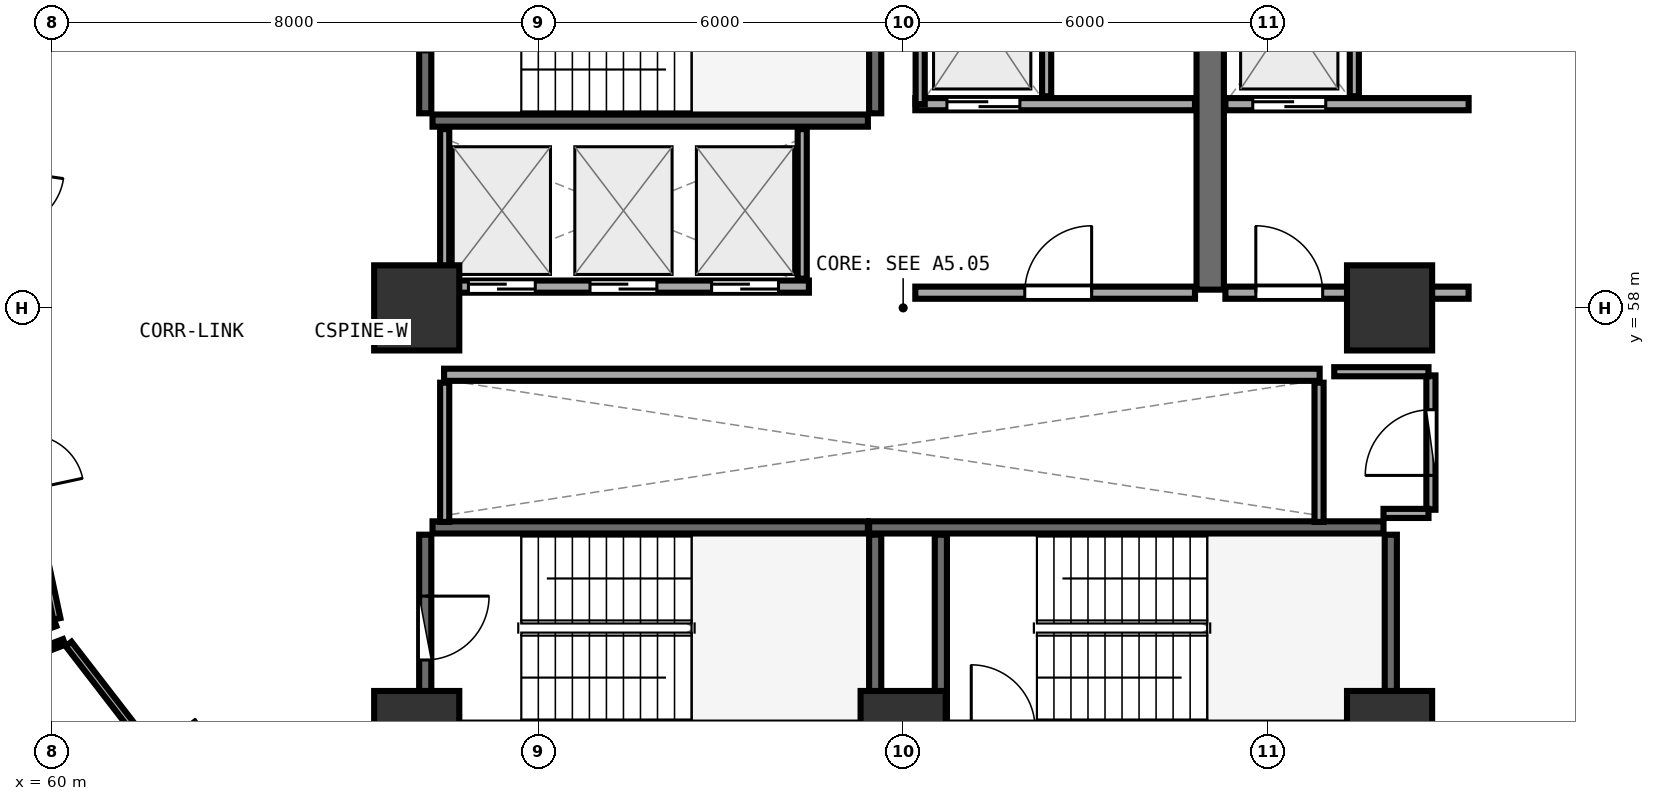
"""IFC4 building model, lengths in metres.
Left out: names, types, materials, properties, quantities, classifications, styles, units other than length and angle.
Written with IfcOpenShell. Run it as: python <this file> out.ifc"""

import sys

from ifc_helpers import new_model, si_unit, direction, frame, frame_2d, origin, origin_2d, place, context, subcontext, project, spatial, rectangle, extrude, element, fill, save


model = new_model("IFC4")
c1 = context("Model", 3, precision=1e-05, world=origin(), true_north=direction((0.0, 1.0)))
c2 = subcontext(c1, "Body", "Model", "MODEL_VIEW")
j1 = project(units=[si_unit("LENGTHUNIT", "METRE"), si_unit("PLANEANGLEUNIT", "RADIAN")], contexts=[c1])
p1 = place(None, origin())
s1 = spatial("IfcSite", under=j1, at=p1, CompositionType="ELEMENT")
p2 = place(p1, origin())
s2 = spatial("IfcBuilding", under=s1, at=p2, CompositionType="ELEMENT")
p3 = place(p2, frame((0.0, 0.0, 76.35)))
s3 = spatial("IfcBuildingStorey", under=s2, at=p3, CompositionType="ELEMENT", Elevation=76.35)
for number, where, z_axis, x_axis in (
    (1, (66.0, 51.0, 0.0), (0.0, 0.0, 1.0), (1.0, 0.0, 0.0)),
    (2, (74.0, 51.0, 0.0), (0.0, 0.0, 1.0), (1.0, 0.0, 0.0)),
    (3, (82.0, 51.0, 0.0), (0.0, 0.0, 1.0), (1.0, 0.0, 0.0)),
    (4, (82.0, 58.0, 0.0), (0.0, 0.0, 1.0), (1.0, 0.0, 0.0)),
    (5, (66.0, 58.0, 0.0), (0.0, 0.0, 1.0), (1.0, 0.0, 0.0)),
):
    element("IfcColumn", number, at=place(p3, frame(where, z_axis=z_axis, x_axis=x_axis)), inside=s3, PredefinedType="PILASTER", context=c2, shape_type="SweptSolid", body=[
        extrude(rectangle(XDim=1.4, YDim=1.4, at=origin_2d()), origin(), (0.0, 0.0, 1.0), 3.75),
    ])
p4 = place(p3, frame((66.26, 61.08, 0.0), z_axis=(0.0, 0.0, 1.0), x_axis=(1.0, 0.0, 0.0)))
e6 = element("IfcWall", 6, at=p4, inside=s3, PredefinedType="SHEAR", context=c2, shape_type="SweptSolid", body=[
    extrude(rectangle(XDim=7.16, YDim=0.2, at=frame_2d((3.58, 0.0))), origin(), (0.0, 0.0, 1.0), 3.49),
])
p5 = place(p3, frame((73.54, 61.2, 0.0), z_axis=(0.0, 0.0, 1.0), x_axis=(0.0, 1.0, 0.0)))
e7 = element("IfcWall", 7, at=p5, inside=s3, PredefinedType="SHEAR", context=c2, shape_type="SweptSolid", body=[
    extrude(rectangle(XDim=3.07, YDim=0.2, at=frame_2d((1.535, 0.0))), origin(), (0.0, 0.0, 1.0), 3.49),
])
p6 = place(p3, frame((66.14, 64.27, 0.0), z_axis=(0.0, 0.0, 1.0), x_axis=(0.0, -1.0, 0.0)))
e8 = element("IfcWall", 8, at=p6, inside=s3, PredefinedType="SHEAR", context=c2, shape_type="SweptSolid", body=[
    extrude(rectangle(XDim=3.07, YDim=0.2, at=frame_2d((1.535, 0.0))), origin(), (0.0, 0.0, 1.0), 3.49),
])
p7 = place(p6, frame((1.01, 0.0, 0.0)))
e9 = element("IfcOpeningElement", 9, at=p7, cuts=e8, PredefinedType="OPENING", context=c2, shape_type="SweptSolid", body=[
    extrude(rectangle(XDim=1.05, YDim=2.1, at=frame_2d((0.525, 1.05))), frame((0.0, 0.11, 0.0), z_axis=(0.0, -1.0, 0.0), x_axis=(1.0, 0.0, 0.0)), (0.0, 0.0, 1.0), 0.22),
])
p8 = place(p3, frame((82.02, 51.2, 0.0), z_axis=(0.0, 0.0, 1.0), x_axis=(0.0, 1.0, 0.0)))
e10 = element("IfcWall", 10, at=p8, inside=s3, PredefinedType="SHEAR", context=c2, shape_type="SweptSolid", body=[
    extrude(rectangle(XDim=3.07, YDim=0.2, at=frame_2d((1.535, 0.0))), origin(), (0.0, 0.0, 1.0), 3.49),
])
p9 = place(p3, frame((81.9, 54.39, 0.0), z_axis=(0.0, 0.0, 1.0), x_axis=(-1.0, 0.0, 0.0)))
e11 = element("IfcWall", 11, at=p9, inside=s3, PredefinedType="SHEAR", context=c2, shape_type="SweptSolid", body=[
    extrude(rectangle(XDim=8.46, YDim=0.2, at=frame_2d((4.23, 0.0))), origin(), (0.0, 0.0, 1.0), 3.49),
])
for number, where, z_axis, x_axis in (
    (12, (74.62, 54.27, 0.0), (0.0, 0.0, 1.0), (0.0, -1.0, 0.0)),
    (13, (73.54, 51.2, 0.0), (0.0, 0.0, 1.0), (0.0, 1.0, 0.0)),
):
    element("IfcWall", number, at=place(p3, frame(where, z_axis=z_axis, x_axis=x_axis)), inside=s3, PredefinedType="SHEAR", context=c2, shape_type="SweptSolid", body=[
        extrude(rectangle(XDim=3.07, YDim=0.2, at=frame_2d((1.535, 0.0))), origin(), (0.0, 0.0, 1.0), 3.49),
    ])
p10 = place(p3, frame((73.42, 54.39, 0.0), z_axis=(0.0, 0.0, 1.0), x_axis=(-1.0, 0.0, 0.0)))
e14 = element("IfcWall", 14, at=p10, inside=s3, PredefinedType="SHEAR", context=c2, shape_type="SweptSolid", body=[
    extrude(rectangle(XDim=7.16, YDim=0.2, at=frame_2d((3.58, 0.0))), origin(), (0.0, 0.0, 1.0), 3.49),
])
p11 = place(p3, frame((66.14, 54.27, 0.0), z_axis=(0.0, 0.0, 1.0), x_axis=(0.0, -1.0, 0.0)))
e15 = element("IfcWall", 15, at=p11, inside=s3, PredefinedType="SHEAR", context=c2, shape_type="SweptSolid", body=[
    extrude(rectangle(XDim=3.07, YDim=0.2, at=frame_2d((1.535, 0.0))), origin(), (0.0, 0.0, 1.0), 3.49),
])
p12 = place(p11, frame((1.01, 0.0, 0.0)))
e16 = element("IfcOpeningElement", 16, at=p12, cuts=e15, PredefinedType="OPENING", context=c2, shape_type="SweptSolid", body=[
    extrude(rectangle(XDim=1.05, YDim=2.1, at=frame_2d((0.525, 1.05))), frame((0.0, 0.11, 0.0), z_axis=(0.0, -1.0, 0.0), x_axis=(1.0, 0.0, 0.0)), (0.0, 0.0, 1.0), 0.22),
])
p13 = place(p3, frame((79.05, 58.3, 0.0), z_axis=(0.0, 0.0, 1.0), x_axis=(0.0, 1.0, 0.0)))
e17 = element("IfcWall", 17, at=p13, inside=s3, PredefinedType="SHEAR", context=c2, shape_type="SweptSolid", body=[
    extrude(rectangle(XDim=6.3, YDim=0.45, at=frame_2d((3.15, 0.0))), origin(), (0.0, 0.0, 1.0), 3.49),
])
p14 = place(p3, frame((74.2, 61.35, 0.0), z_axis=(0.0, 0.0, 1.0), x_axis=(1.0, 0.0, 0.0)))
e18 = element("IfcWall", 18, at=p14, inside=s3, PredefinedType="SOLIDWALL", context=c2, shape_type="SweptSolid", body=[
    extrude(rectangle(XDim=4.6, YDim=0.2, at=frame_2d((2.3, 0.0))), origin(), (0.0, 0.0, 1.0), 3.48),
])
p15 = place(p14, frame((0.52, 0.0, 0.0)))
e19 = element("IfcOpeningElement", 19, at=p15, cuts=e18, PredefinedType="OPENING", context=c2, shape_type="SweptSolid", body=[
    extrude(rectangle(XDim=1.2, YDim=2.15, at=frame_2d((0.6, 1.075))), frame((0.0, 0.11, 0.0), z_axis=(0.0, -1.0, 0.0), x_axis=(1.0, 0.0, 0.0)), (0.0, 0.0, 1.0), 0.22),
])
p16 = place(p3, frame((74.28, 61.35, 0.0), z_axis=(0.0, 0.0, 1.0), x_axis=(0.0, 1.0, 0.0)))
e20 = element("IfcWall", 20, at=p16, inside=s3, PredefinedType="PARTITIONING", context=c2, shape_type="SweptSolid", body=[
    extrude(rectangle(XDim=2.97, YDim=0.15, at=frame_2d((1.485, 0.0))), origin(), (0.0, 0.0, 1.0), 3.48),
])
p17 = place(p3, frame((76.36, 61.48, 0.0), z_axis=(0.0, 0.0, 1.0), x_axis=(0.0, 1.0, 0.0)))
e21 = element("IfcWall", 21, at=p17, inside=s3, PredefinedType="PARTITIONING", context=c2, shape_type="SweptSolid", body=[
    extrude(rectangle(XDim=2.84, YDim=0.15, at=frame_2d((1.42, 0.0))), origin(), (0.0, 0.0, 1.0), 3.48),
])
p18 = place(p3, frame((79.3, 61.35, 0.0), z_axis=(0.0, 0.0, 1.0), x_axis=(1.0, 0.0, 0.0)))
e22 = element("IfcWall", 22, at=p18, inside=s3, PredefinedType="SOLIDWALL", context=c2, shape_type="SweptSolid", body=[
    extrude(rectangle(XDim=4.0, YDim=0.2, at=frame_2d((2.0, 0.0))), origin(), (0.0, 0.0, 1.0), 2.775),
])
p19 = place(p18, frame((0.45, 0.0, 0.0)))
e23 = element("IfcOpeningElement", 23, at=p19, cuts=e22, PredefinedType="OPENING", context=c2, shape_type="SweptSolid", body=[
    extrude(rectangle(XDim=1.2, YDim=2.15, at=frame_2d((0.6, 1.075))), frame((0.0, 0.11, 0.0), z_axis=(0.0, -1.0, 0.0), x_axis=(1.0, 0.0, 0.0)), (0.0, 0.0, 1.0), 0.22),
])
p20 = place(p3, frame((81.42, 61.48, 0.0), z_axis=(0.0, 0.0, 1.0), x_axis=(0.0, 1.0, 0.0)))
e24 = element("IfcWall", 24, at=p20, inside=s3, PredefinedType="PARTITIONING", context=c2, shape_type="SweptSolid", body=[
    extrude(rectangle(XDim=2.84, YDim=0.15, at=frame_2d((1.42, 0.0))), origin(), (0.0, 0.0, 1.0), 3.48),
])
p21 = place(p3, frame((74.2, 58.25, 0.0), z_axis=(0.0, 0.0, 1.0), x_axis=(1.0, 0.0, 0.0)))
e25 = element("IfcWall", 25, at=p21, inside=s3, PredefinedType="SOLIDWALL", context=c2, shape_type="SweptSolid", body=[
    extrude(rectangle(XDim=4.6, YDim=0.2, at=frame_2d((2.3, 0.0))), origin(), (0.0, 0.0, 1.0), 3.48),
])
p22 = place(p21, frame((1.8, 0.0, 0.0)))
e26 = element("IfcOpeningElement", 26, at=p22, cuts=e25, PredefinedType="OPENING", context=c2, shape_type="SweptSolid", body=[
    extrude(rectangle(XDim=1.1, YDim=2.1, at=frame_2d((0.55, 1.05))), frame((0.0, 0.11, 0.0), z_axis=(0.0, -1.0, 0.0), x_axis=(1.0, 0.0, 0.0)), (0.0, 0.0, 1.0), 0.22),
])
p23 = place(p3, frame((79.3, 58.25, 0.0), z_axis=(0.0, 0.0, 1.0), x_axis=(1.0, 0.0, 0.0)))
e27 = element("IfcWall", 27, at=p23, inside=s3, PredefinedType="SOLIDWALL", context=c2, shape_type="SweptSolid", body=[
    extrude(rectangle(XDim=4.0, YDim=0.2, at=frame_2d((2.0, 0.0))), origin(), (0.0, 0.0, 1.0), 2.775),
])
p24 = place(p23, frame((0.5, 0.0, 0.0)))
e28 = element("IfcOpeningElement", 28, at=p24, cuts=e27, PredefinedType="OPENING", context=c2, shape_type="SweptSolid", body=[
    extrude(rectangle(XDim=1.1, YDim=2.1, at=frame_2d((0.55, 1.05))), frame((0.0, 0.11, 0.0), z_axis=(0.0, -1.0, 0.0), x_axis=(1.0, 0.0, 0.0)), (0.0, 0.0, 1.0), 0.22),
])
p25 = place(p3, frame((66.45, 58.35, 0.0), z_axis=(0.0, 0.0, 1.0), x_axis=(1.0, 0.0, 0.0)))
e29 = element("IfcWall", 29, at=p25, inside=s3, PredefinedType="SOLIDWALL", context=c2, shape_type="SweptSolid", body=[
    extrude(rectangle(XDim=6.0, YDim=0.2, at=frame_2d((3.0, 0.0))), origin(), (0.0, 0.0, 1.0), 3.48),
])
p26 = place(p25, frame((0.4, 0.0, 0.0)))
e30 = element("IfcOpeningElement", 30, at=p26, cuts=e29, PredefinedType="OPENING", context=c2, shape_type="SweptSolid", body=[
    extrude(rectangle(XDim=1.1, YDim=2.1, at=frame_2d((0.55, 1.05))), frame((0.0, 0.11, 0.0), z_axis=(0.0, -1.0, 0.0), x_axis=(1.0, 0.0, 0.0)), (0.0, 0.0, 1.0), 0.22),
])
p27 = place(p25, frame((2.4, 0.0, 0.0)))
e31 = element("IfcOpeningElement", 31, at=p27, cuts=e29, PredefinedType="OPENING", context=c2, shape_type="SweptSolid", body=[
    extrude(rectangle(XDim=1.1, YDim=2.1, at=frame_2d((0.55, 1.05))), frame((0.0, 0.11, 0.0), z_axis=(0.0, -1.0, 0.0), x_axis=(1.0, 0.0, 0.0)), (0.0, 0.0, 1.0), 0.22),
])
p28 = place(p25, frame((4.4, 0.0, 0.0)))
e32 = element("IfcOpeningElement", 32, at=p28, cuts=e29, PredefinedType="OPENING", context=c2, shape_type="SweptSolid", body=[
    extrude(rectangle(XDim=1.1, YDim=2.1, at=frame_2d((0.55, 1.05))), frame((0.0, 0.11, 0.0), z_axis=(0.0, -1.0, 0.0), x_axis=(1.0, 0.0, 0.0)), (0.0, 0.0, 1.0), 0.22),
])
for number, where, z_axis, x_axis in (
    (33, (66.46, 58.48, 0.0), (0.0, 0.0, 1.0), (0.0, 1.0, 0.0)),
    (34, (72.34, 58.48, 0.0), (0.0, 0.0, 1.0), (0.0, 1.0, 0.0)),
):
    element("IfcWall", number, at=place(p3, frame(where, z_axis=z_axis, x_axis=x_axis)), inside=s3, PredefinedType="PARTITIONING", context=c2, shape_type="SweptSolid", body=[
        extrude(rectangle(XDim=2.46, YDim=0.15, at=frame_2d((1.23, 0.0))), origin(), (0.0, 0.0, 1.0), 3.48),
    ])
p29 = place(p3, frame((66.45, 56.9, 0.0), z_axis=(0.0, 0.0, 1.0), x_axis=(1.0, 0.0, 0.0)))
e35 = element("IfcWall", 35, at=p29, inside=s3, PredefinedType="SOLIDWALL", context=c2, shape_type="SweptSolid", body=[
    extrude(rectangle(XDim=14.4, YDim=0.2, at=frame_2d((7.2, 0.0))), origin(), (0.0, 0.0, 1.0), 3.48),
])
for number, where, z_axis, x_axis in (
    (36, (66.46, 54.48, 0.0), (0.0, 0.0, 1.0), (0.0, 1.0, 0.0)),
    (37, (80.84, 54.48, 0.0), (0.0, 0.0, 1.0), (0.0, 1.0, 0.0)),
):
    element("IfcWall", number, at=place(p3, frame(where, z_axis=z_axis, x_axis=x_axis)), inside=s3, PredefinedType="PARTITIONING", context=c2, shape_type="SweptSolid", body=[
        extrude(rectangle(XDim=2.29, YDim=0.15, at=frame_2d((1.145, 0.0))), origin(), (0.0, 0.0, 1.0), 3.48),
    ])
p30 = place(p3, frame((82.68, 54.68, 0.0), z_axis=(0.0, 0.0, 1.0), x_axis=(0.0, 1.0, 0.0)))
e38 = element("IfcWall", 38, at=p30, inside=s3, PredefinedType="PARTITIONING", context=c2, shape_type="SweptSolid", body=[
    extrude(rectangle(XDim=2.21, YDim=0.15, at=frame_2d((1.105, 0.0))), origin(), (0.0, 0.0, 1.0), 3.48),
])
p31 = place(p30, frame((0.565, 0.0, 0.0)))
e39 = element("IfcOpeningElement", 39, at=p31, cuts=e38, PredefinedType="OPENING", context=c2, shape_type="SweptSolid", body=[
    extrude(rectangle(XDim=1.08, YDim=2.1, at=frame_2d((0.54, 1.05))), frame((0.0, 0.085, 0.0), z_axis=(0.0, -1.0, 0.0), x_axis=(1.0, 0.0, 0.0)), (0.0, 0.0, 1.0), 0.17),
])
p32 = place(p3, frame((58.983, 58.012, 0.0), z_axis=(0.0, 0.0, 1.0), x_axis=(0.209586341226, -0.977790143933, 0.0)))
e40 = element("IfcWall", 40, at=p32, inside=s3, PredefinedType="PARTITIONING", context=c2, shape_type="SweptSolid", body=[
    extrude(rectangle(XDim=5.242, YDim=0.12, at=frame_2d((2.621, 0.0))), origin(), (0.0, 0.0, 1.0), 2.925),
])
p33 = place(p32, frame((2.171, 0.0, 0.0)))
e41 = element("IfcOpeningElement", 41, at=p33, cuts=e40, PredefinedType="OPENING", context=c2, shape_type="SweptSolid", body=[
    extrude(rectangle(XDim=0.9, YDim=2.08, at=frame_2d((0.45, 1.04))), frame((0.0, 0.07, 0.0), z_axis=(0.0, -1.0, 0.0), x_axis=(1.0, 0.0, 0.0)), (0.0, 0.0, 1.0), 0.14),
])
p34 = place(p3, frame((60.275, 52.473, 0.0), z_axis=(0.0, 0.0, 1.0), x_axis=(0.611167326409, -0.791501420801, 0.0)))
e42 = element("IfcWall", 42, at=p34, inside=s3, PredefinedType="PARTITIONING", context=c2, shape_type="SweptSolid", body=[
    extrude(rectangle(XDim=5.407, YDim=0.12, at=frame_2d((2.704, 0.0))), origin(), (0.0, 0.0, 1.0), 2.925),
])
p35 = place(p34, frame((2.254, 0.0, 0.0)))
e43 = element("IfcOpeningElement", 43, at=p35, cuts=e42, PredefinedType="OPENING", context=c2, shape_type="SweptSolid", body=[
    extrude(rectangle(XDim=0.9, YDim=2.08, at=frame_2d((0.45, 1.04))), frame((0.0, 0.07, 0.0), z_axis=(0.0, -1.0, 0.0), x_axis=(1.0, 0.0, 0.0)), (0.0, 0.0, 1.0), 0.14),
])
p36 = place(p3, frame((81.9, 54.62, 0.0), z_axis=(0.0, 0.0, 1.0), x_axis=(1.0, 0.0, 0.0)))
e44 = element("IfcWall", 44, at=p36, inside=s3, PredefinedType="PARTITIONING", context=c2, shape_type="SweptSolid", body=[
    extrude(rectangle(XDim=0.74, YDim=0.15, at=frame_2d((0.37, 0.0))), origin(), (0.0, 0.0, 1.0), 2.775),
])
p37 = place(p3, frame((82.64, 56.95, 0.0), z_axis=(0.0, 0.0, 1.0), x_axis=(-1.0, 0.0, 0.0)))
e45 = element("IfcWall", 45, at=p37, inside=s3, PredefinedType="PARTITIONING", context=c2, shape_type="SweptSolid", body=[
    extrude(rectangle(XDim=1.55, YDim=0.15, at=frame_2d((0.775, 0.0))), origin(), (0.0, 0.0, 1.0), 2.775),
])
p38 = place(p3, frame((60.056, 52.814, 0.0), z_axis=(0.0, 0.0, 1.0), x_axis=(-0.940543515483, -0.339673218671, 0.0)))
e46 = element("IfcWall", 46, at=p38, inside=s3, PredefinedType="PARTITIONING", context=c2, shape_type="SweptSolid", body=[
    extrude(rectangle(XDim=9.806, YDim=0.1, at=frame_2d((4.903, 0.0))), origin(), (0.0, 0.0, 1.0), 2.925),
])
p39 = place(p3, frame((51.072, 48.979, 0.0), z_axis=(0.0, 0.0, 1.0), x_axis=(0.932757339165, 0.360504849112, 0.0)))
e47 = element("IfcWall", 47, at=p39, inside=s3, PredefinedType="PARTITIONING", context=c2, shape_type="SweptSolid", body=[
    extrude(rectangle(XDim=9.786, YDim=0.1, at=frame_2d((4.893, 0.0))), origin(), (0.0, 0.0, 1.0), 2.925),
])
p40 = place(p12, origin())
e48 = element("IfcDoor", 48, at=p40, inside=s3, OperationType="SINGLE_SWING_LEFT", PredefinedType="DOOR", context=c2, shape_type="SweptSolid", body=[
    extrude(rectangle(XDim=1.05, YDim=2.1, at=frame_2d((0.525, 1.05))), frame((0.0, 0.025, 0.0), z_axis=(0.0, -1.0, 0.0), x_axis=(1.0, 0.0, 0.0)), (0.0, 0.0, 1.0), 0.05),
])
fill(e16, e48)
p41 = place(p15, origin())
e49 = element("IfcDoor", 49, at=p41, inside=s3, OperationType="DOUBLE_DOOR_SLIDING", PredefinedType="DOOR", context=c2, shape_type="SweptSolid", body=[
    extrude(rectangle(XDim=1.2, YDim=2.15, at=frame_2d((0.6, 1.075))), frame((0.0, 0.025, 0.0), z_axis=(0.0, -1.0, 0.0), x_axis=(1.0, 0.0, 0.0)), (0.0, 0.0, 1.0), 0.05),
])
fill(e19, e49)
p42 = place(p19, origin())
e50 = element("IfcDoor", 50, at=p42, inside=s3, OperationType="DOUBLE_DOOR_SLIDING", PredefinedType="DOOR", context=c2, shape_type="SweptSolid", body=[
    extrude(rectangle(XDim=1.2, YDim=2.15, at=frame_2d((0.6, 1.075))), frame((0.0, 0.025, 0.0), z_axis=(0.0, -1.0, 0.0), x_axis=(1.0, 0.0, 0.0)), (0.0, 0.0, 1.0), 0.05),
])
fill(e23, e50)
p43 = place(p22, frame((1.1, 0.0, 0.0), z_axis=(0.0, 0.0, 1.0), x_axis=(-1.0, 0.0, 0.0)))
e51 = element("IfcDoor", 51, at=p43, inside=s3, OperationType="SINGLE_SWING_LEFT", PredefinedType="DOOR", context=c2, shape_type="SweptSolid", body=[
    extrude(rectangle(XDim=1.1, YDim=2.1, at=frame_2d((0.55, 1.05))), frame((0.0, 0.025, 0.0), z_axis=(0.0, -1.0, 0.0), x_axis=(1.0, 0.0, 0.0)), (0.0, 0.0, 1.0), 0.05),
])
fill(e26, e51)
p44 = place(p24, frame((1.1, 0.0, 0.0), z_axis=(0.0, 0.0, 1.0), x_axis=(-1.0, 0.0, 0.0)))
e52 = element("IfcDoor", 52, at=p44, inside=s3, OperationType="SINGLE_SWING_RIGHT", PredefinedType="DOOR", context=c2, shape_type="SweptSolid", body=[
    extrude(rectangle(XDim=1.1, YDim=2.1, at=frame_2d((0.55, 1.05))), frame((0.0, 0.025, 0.0), z_axis=(0.0, -1.0, 0.0), x_axis=(1.0, 0.0, 0.0)), (0.0, 0.0, 1.0), 0.05),
])
fill(e28, e52)
p45 = place(p26, origin())
e53 = element("IfcDoor", 53, at=p45, inside=s3, OperationType="DOUBLE_DOOR_SLIDING", PredefinedType="DOOR", context=c2, shape_type="SweptSolid", body=[
    extrude(rectangle(XDim=1.1, YDim=2.1, at=frame_2d((0.55, 1.05))), frame((0.0, 0.025, 0.0), z_axis=(0.0, -1.0, 0.0), x_axis=(1.0, 0.0, 0.0)), (0.0, 0.0, 1.0), 0.05),
])
fill(e30, e53)
p46 = place(p27, origin())
e54 = element("IfcDoor", 54, at=p46, inside=s3, OperationType="DOUBLE_DOOR_SLIDING", PredefinedType="DOOR", context=c2, shape_type="SweptSolid", body=[
    extrude(rectangle(XDim=1.1, YDim=2.1, at=frame_2d((0.55, 1.05))), frame((0.0, 0.025, 0.0), z_axis=(0.0, -1.0, 0.0), x_axis=(1.0, 0.0, 0.0)), (0.0, 0.0, 1.0), 0.05),
])
fill(e31, e54)
p47 = place(p28, origin())
e55 = element("IfcDoor", 55, at=p47, inside=s3, OperationType="DOUBLE_DOOR_SLIDING", PredefinedType="DOOR", context=c2, shape_type="SweptSolid", body=[
    extrude(rectangle(XDim=1.1, YDim=2.1, at=frame_2d((0.55, 1.05))), frame((0.0, 0.025, 0.0), z_axis=(0.0, -1.0, 0.0), x_axis=(1.0, 0.0, 0.0)), (0.0, 0.0, 1.0), 0.05),
])
fill(e32, e55)
p48 = place(p31, origin())
e56 = element("IfcDoor", 56, at=p48, inside=s3, OperationType="SINGLE_SWING_LEFT", PredefinedType="DOOR", context=c2, shape_type="SweptSolid", body=[
    extrude(rectangle(XDim=1.08, YDim=2.1, at=frame_2d((0.54, 1.05))), frame((0.0, 0.025, 0.0), z_axis=(0.0, -1.0, 0.0), x_axis=(1.0, 0.0, 0.0)), (0.0, 0.0, 1.0), 0.05),
])
fill(e39, e56)
save(model, sys.argv[1])
